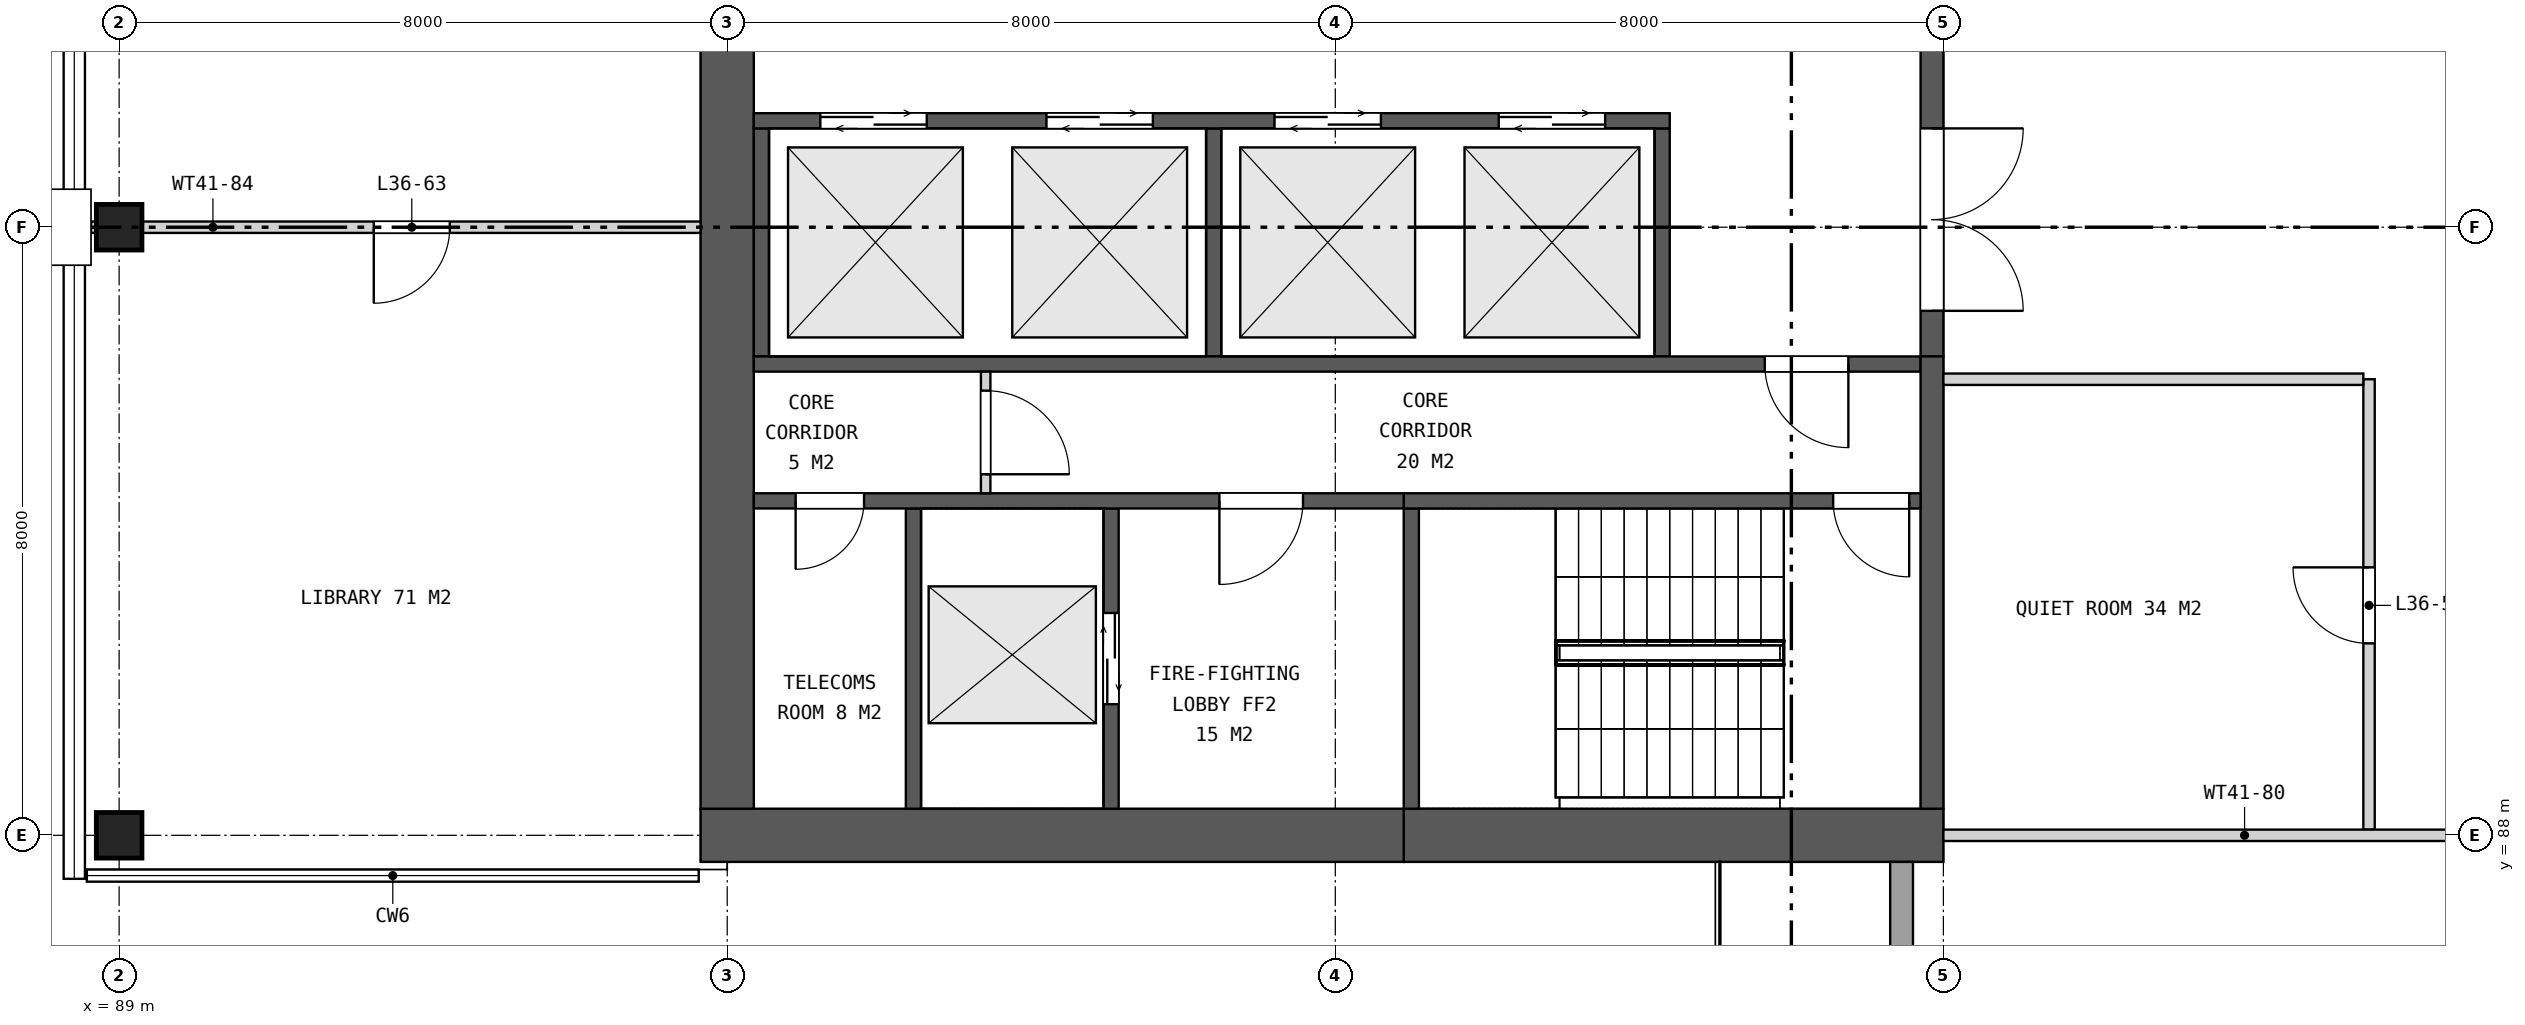
"""IFC4 building model, lengths in metres.
Left out: names, types, materials, properties, quantities, classifications, styles, units other than length and angle.
Written with IfcOpenShell. Run it as: python <this file> out.ifc"""

import sys

from ifc_helpers import new_model, si_unit, direction, frame, frame_2d, origin, origin_2d, place, context, subcontext, project, spatial, rectangle, extrude, element, fill, save


model = new_model("IFC4")
c1 = context("Model", 3, precision=1e-05, world=origin(), true_north=direction((0.0, 1.0)))
c2 = subcontext(c1, "Body", "Model", "MODEL_VIEW")
j1 = project(units=[si_unit("LENGTHUNIT", "METRE"), si_unit("PLANEANGLEUNIT", "RADIAN")], contexts=[c1])
p1 = place(None, origin())
s1 = spatial("IfcSite", under=j1, at=p1, CompositionType="ELEMENT")
p2 = place(p1, origin())
s2 = spatial("IfcBuilding", under=s1, at=p2, CompositionType="ELEMENT")
p3 = place(p2, frame((0.0, 0.0, 171.5)))
s3 = spatial("IfcBuildingStorey", under=s2, at=p3, CompositionType="ELEMENT", Elevation=171.5)
for number, where, z_axis, x_axis in (
    (1, (89.0, 88.0, 0.0), (0.0, 0.0, 1.0), (1.0, 0.0, 0.0)),
    (2, (89.0, 96.0, 0.0), (0.0, 0.0, 1.0), (1.0, 0.0, 0.0)),
):
    element("IfcColumn", number, at=place(p3, frame(where, z_axis=z_axis, x_axis=x_axis)), inside=s3, PredefinedType="COLUMN", context=c2, shape_type="SweptSolid", body=[
        extrude(rectangle(XDim=0.6, YDim=0.6, at=origin_2d()), origin(), (0.0, 0.0, 1.0), 7.4),
    ])
p4 = place(p3, frame((113.0, 88.0, 0.0), z_axis=(0.0, 0.0, 1.0), x_axis=(-1.0, 0.0, 0.0)))
e3 = element("IfcWall", 3, at=p4, inside=s3, PredefinedType="SHEAR", context=c2, shape_type="SweptSolid", body=[
    extrude(rectangle(XDim=7.1, YDim=0.7, at=frame_2d((3.55, 0.0))), origin(), (0.0, 0.0, 1.0), 7.4),
])
p5 = place(p3, frame((105.9, 88.0, 0.0), z_axis=(0.0, 0.0, 1.0), x_axis=(-1.0, 0.0, 0.0)))
e4 = element("IfcWall", 4, at=p5, inside=s3, PredefinedType="SHEAR", context=c2, shape_type="SweptSolid", body=[
    extrude(rectangle(XDim=9.25, YDim=0.7, at=frame_2d((4.625, 0.0))), origin(), (0.0, 0.0, 1.0), 7.4),
])
p6 = place(p3, frame((97.0, 111.65, 0.0), z_axis=(0.0, 0.0, 1.0), x_axis=(0.0, -1.0, 0.0)))
e5 = element("IfcWall", 5, at=p6, inside=s3, PredefinedType="SHEAR", context=c2, shape_type="SweptSolid", body=[
    extrude(rectangle(XDim=23.3, YDim=0.7, at=frame_2d((11.65, 0.0))), origin(), (0.0, 0.0, 1.0), 7.4),
])
p7 = place(p6, frame((10.45, 0.0, 0.0)))
e6 = element("IfcOpeningElement", 6, at=p7, cuts=e5, PredefinedType="OPENING", context=c2, shape_type="SweptSolid", body=[
    extrude(rectangle(XDim=2.4, YDim=2.4, at=frame_2d((1.2, 1.2))), frame((0.0, 0.36, 0.0), z_axis=(0.0, -1.0, 0.0), x_axis=(1.0, 0.0, 0.0)), (0.0, 0.0, 1.0), 0.72),
])
p8 = place(p3, frame((112.85, 105.7, 0.0), z_axis=(0.0, 0.0, 1.0), x_axis=(0.0, -1.0, 0.0)))
e7 = element("IfcWall", 7, at=p8, inside=s3, PredefinedType="SHEAR", context=c2, shape_type="SweptSolid", body=[
    extrude(rectangle(XDim=11.4, YDim=0.3, at=frame_2d((5.7, 0.0))), origin(), (0.0, 0.0, 1.0), 7.4),
])
p9 = place(p8, frame((0.6, 0.0, 0.0)))
e8 = element("IfcOpeningElement", 8, at=p9, cuts=e7, PredefinedType="OPENING", context=c2, shape_type="SweptSolid", body=[
    extrude(rectangle(XDim=2.4, YDim=2.4, at=frame_2d((1.2, 1.2))), frame((0.0, 0.16, 0.0), z_axis=(0.0, -1.0, 0.0), x_axis=(1.0, 0.0, 0.0)), (0.0, 0.0, 1.0), 0.32),
])
p10 = place(p8, frame((4.5, 0.0, 0.0)))
e9 = element("IfcOpeningElement", 9, at=p10, cuts=e7, PredefinedType="OPENING", context=c2, shape_type="SweptSolid", body=[
    extrude(rectangle(XDim=2.4, YDim=2.4, at=frame_2d((1.2, 1.2))), frame((0.0, 0.16, 0.0), z_axis=(0.0, -1.0, 0.0), x_axis=(1.0, 0.0, 0.0)), (0.0, 0.0, 1.0), 0.32),
])
p11 = place(p8, frame((8.4, 0.0, 0.0)))
e10 = element("IfcOpeningElement", 10, at=p11, cuts=e7, PredefinedType="OPENING", context=c2, shape_type="SweptSolid", body=[
    extrude(rectangle(XDim=2.4, YDim=2.4, at=frame_2d((1.2, 1.2))), frame((0.0, 0.16, 0.0), z_axis=(0.0, -1.0, 0.0), x_axis=(1.0, 0.0, 0.0)), (0.0, 0.0, 1.0), 0.32),
])
for number, where, z_axis, x_axis in (
    (11, (109.3, 97.3, 0.0), (0.0, 0.0, 1.0), (0.0, -1.0, 0.0)),
    (12, (103.4, 97.3, 0.0), (0.0, 0.0, 1.0), (0.0, -1.0, 0.0)),
    (13, (97.45, 97.3, 0.0), (0.0, 0.0, 1.0), (0.0, -1.0, 0.0)),
):
    element("IfcWall", number, at=place(p3, frame(where, z_axis=z_axis, x_axis=x_axis)), inside=s3, PredefinedType="SHEAR", context=c2, shape_type="SweptSolid", body=[
        extrude(rectangle(XDim=3.0, YDim=0.2, at=frame_2d((1.5, 0.0))), origin(), (0.0, 0.0, 1.0), 7.4),
    ])
p12 = place(p3, frame((109.4, 97.4, 0.0), z_axis=(0.0, 0.0, 1.0), x_axis=(-1.0, 0.0, 0.0)))
e14 = element("IfcWall", 14, at=p12, inside=s3, PredefinedType="SHEAR", context=c2, shape_type="SweptSolid", body=[
    extrude(rectangle(XDim=12.05, YDim=0.2, at=frame_2d((6.025, 0.0))), origin(), (0.0, 0.0, 1.0), 7.4),
])
p13 = place(p12, frame((0.85, 0.0, 0.0)))
e15 = element("IfcOpeningElement", 15, at=p13, cuts=e14, PredefinedType="OPENING", context=c2, shape_type="SweptSolid", body=[
    extrude(rectangle(XDim=1.4, YDim=2.1, at=frame_2d((0.7, 1.05))), frame((0.0, 0.11, 0.0), z_axis=(0.0, -1.0, 0.0), x_axis=(1.0, 0.0, 0.0)), (0.0, 0.0, 1.0), 0.22),
])
p14 = place(p12, frame((3.8, 0.0, 0.0)))
e16 = element("IfcOpeningElement", 16, at=p14, cuts=e14, PredefinedType="OPENING", context=c2, shape_type="SweptSolid", body=[
    extrude(rectangle(XDim=1.4, YDim=2.1, at=frame_2d((0.7, 1.05))), frame((0.0, 0.11, 0.0), z_axis=(0.0, -1.0, 0.0), x_axis=(1.0, 0.0, 0.0)), (0.0, 0.0, 1.0), 0.22),
])
p15 = place(p12, frame((6.8, 0.0, 0.0)))
e17 = element("IfcOpeningElement", 17, at=p15, cuts=e14, PredefinedType="OPENING", context=c2, shape_type="SweptSolid", body=[
    extrude(rectangle(XDim=1.4, YDim=2.1, at=frame_2d((0.7, 1.05))), frame((0.0, 0.11, 0.0), z_axis=(0.0, -1.0, 0.0), x_axis=(1.0, 0.0, 0.0)), (0.0, 0.0, 1.0), 0.22),
])
p16 = place(p12, frame((9.775, 0.0, 0.0)))
e18 = element("IfcOpeningElement", 18, at=p16, cuts=e14, PredefinedType="OPENING", context=c2, shape_type="SweptSolid", body=[
    extrude(rectangle(XDim=1.4, YDim=2.1, at=frame_2d((0.7, 1.05))), frame((0.0, 0.11, 0.0), z_axis=(0.0, -1.0, 0.0), x_axis=(1.0, 0.0, 0.0)), (0.0, 0.0, 1.0), 0.22),
])
p17 = place(p3, frame((112.7, 94.2, 0.0), z_axis=(0.0, 0.0, 1.0), x_axis=(-1.0, 0.0, 0.0)))
e19 = element("IfcWall", 19, at=p17, inside=s3, PredefinedType="SHEAR", context=c2, shape_type="SweptSolid", body=[
    extrude(rectangle(XDim=15.35, YDim=0.2, at=frame_2d((7.675, 0.0))), origin(), (0.0, 0.0, 1.0), 7.4),
])
p18 = place(p17, frame((0.95, 0.0, 0.0)))
e20 = element("IfcOpeningElement", 20, at=p18, cuts=e19, PredefinedType="OPENING", context=c2, shape_type="SweptSolid", body=[
    extrude(rectangle(XDim=1.1, YDim=2.1, at=frame_2d((0.55, 1.05))), frame((0.0, 0.11, 0.0), z_axis=(0.0, -1.0, 0.0), x_axis=(1.0, 0.0, 0.0)), (0.0, 0.0, 1.0), 0.22),
])
p19 = place(p3, frame((112.85, 94.3, 0.0), z_axis=(0.0, 0.0, 1.0), x_axis=(0.0, -1.0, 0.0)))
e21 = element("IfcWall", 21, at=p19, inside=s3, PredefinedType="SHEAR", context=c2, shape_type="SweptSolid", body=[
    extrude(rectangle(XDim=5.95, YDim=0.3, at=frame_2d((2.975, 0.0))), origin(), (0.0, 0.0, 1.0), 7.4),
])
p20 = place(p3, frame((106.0, 92.3, 0.0), z_axis=(0.0, 0.0, 1.0), x_axis=(0.0, -1.0, 0.0)))
e22 = element("IfcWall", 22, at=p20, inside=s3, PredefinedType="SHEAR", context=c2, shape_type="SweptSolid", body=[
    extrude(rectangle(XDim=3.95, YDim=0.2, at=frame_2d((1.975, 0.0))), origin(), (0.0, 0.0, 1.0), 7.4),
])
p21 = place(p3, frame((102.05, 92.3, 0.0), z_axis=(0.0, 0.0, 1.0), x_axis=(0.0, -1.0, 0.0)))
e23 = element("IfcWall", 23, at=p21, inside=s3, PredefinedType="SHEAR", context=c2, shape_type="SweptSolid", body=[
    extrude(rectangle(XDim=3.95, YDim=0.2, at=frame_2d((1.975, 0.0))), origin(), (0.0, 0.0, 1.0), 7.4),
])
p22 = place(p21, frame((1.375, 0.0, 0.0)))
e24 = element("IfcOpeningElement", 24, at=p22, cuts=e23, PredefinedType="OPENING", context=c2, shape_type="SweptSolid", body=[
    extrude(rectangle(XDim=1.2, YDim=2.1, at=frame_2d((0.6, 1.05))), frame((0.0, 0.11, 0.0), z_axis=(0.0, -1.0, 0.0), x_axis=(1.0, 0.0, 0.0)), (0.0, 0.0, 1.0), 0.22),
])
p23 = place(p3, frame((99.45, 92.3, 0.0), z_axis=(0.0, 0.0, 1.0), x_axis=(0.0, -1.0, 0.0)))
e25 = element("IfcWall", 25, at=p23, inside=s3, PredefinedType="SHEAR", context=c2, shape_type="SweptSolid", body=[
    extrude(rectangle(XDim=3.95, YDim=0.2, at=frame_2d((1.975, 0.0))), origin(), (0.0, 0.0, 1.0), 7.4),
])
p24 = place(p3, frame((112.7, 92.4, 0.0), z_axis=(0.0, 0.0, 1.0), x_axis=(-1.0, 0.0, 0.0)))
e26 = element("IfcWall", 26, at=p24, inside=s3, PredefinedType="SHEAR", context=c2, shape_type="SweptSolid", body=[
    extrude(rectangle(XDim=6.8, YDim=0.2, at=frame_2d((3.4, 0.0))), origin(), (0.0, 0.0, 1.0), 7.4),
])
p25 = place(p24, frame((0.15, 0.0, 0.0)))
e27 = element("IfcOpeningElement", 27, at=p25, cuts=e26, PredefinedType="OPENING", context=c2, shape_type="SweptSolid", body=[
    extrude(rectangle(XDim=1.0, YDim=2.1, at=frame_2d((0.5, 1.05))), frame((0.0, 0.11, 0.0), z_axis=(0.0, -1.0, 0.0), x_axis=(1.0, 0.0, 0.0)), (0.0, 0.0, 1.0), 0.22),
])
p26 = place(p3, frame((105.9, 92.4, 0.0), z_axis=(0.0, 0.0, 1.0), x_axis=(-1.0, 0.0, 0.0)))
e28 = element("IfcWall", 28, at=p26, inside=s3, PredefinedType="SHEAR", context=c2, shape_type="SweptSolid", body=[
    extrude(rectangle(XDim=8.55, YDim=0.2, at=frame_2d((4.275, 0.0))), origin(), (0.0, 0.0, 1.0), 7.4),
])
p27 = place(p26, frame((1.325, 0.0, 0.0)))
e29 = element("IfcOpeningElement", 29, at=p27, cuts=e28, PredefinedType="OPENING", context=c2, shape_type="SweptSolid", body=[
    extrude(rectangle(XDim=1.1, YDim=2.1, at=frame_2d((0.55, 1.05))), frame((0.0, 0.11, 0.0), z_axis=(0.0, -1.0, 0.0), x_axis=(1.0, 0.0, 0.0)), (0.0, 0.0, 1.0), 0.22),
])
p28 = place(p26, frame((7.1, 0.0, 0.0)))
e30 = element("IfcOpeningElement", 30, at=p28, cuts=e28, PredefinedType="OPENING", context=c2, shape_type="SweptSolid", body=[
    extrude(rectangle(XDim=0.9, YDim=2.1, at=frame_2d((0.45, 1.05))), frame((0.0, 0.11, 0.0), z_axis=(0.0, -1.0, 0.0), x_axis=(1.0, 0.0, 0.0)), (0.0, 0.0, 1.0), 0.22),
])
p29 = place(p3, frame((100.4, 94.1, 0.0), z_axis=(0.0, 0.0, 1.0), x_axis=(0.0, -1.0, 0.0)))
e31 = element("IfcWall", 31, at=p29, inside=s3, PredefinedType="PARTITIONING", context=c2, shape_type="SweptSolid", body=[
    extrude(rectangle(XDim=1.6, YDim=0.125, at=frame_2d((0.8, 0.0))), origin(), (0.0, 0.0, 1.0), 7.4),
])
p30 = place(p29, frame((0.25, 0.0, 0.0)))
e32 = element("IfcOpeningElement", 32, at=p30, cuts=e31, PredefinedType="OPENING", context=c2, shape_type="SweptSolid", body=[
    extrude(rectangle(XDim=1.1, YDim=2.1, at=frame_2d((0.55, 1.05))), frame((0.0, 0.073, 0.0), z_axis=(0.0, -1.0, 0.0), x_axis=(1.0, 0.0, 0.0)), (0.0, 0.0, 1.0), 0.145),
])
p31 = place(p3, frame((112.45, 87.65, 0.0), z_axis=(0.0, 0.0, 1.0), x_axis=(0.0, -1.0, 0.0)))
e33 = element("IfcWall", 33, at=p31, inside=s3, PredefinedType="SOLIDWALL", context=c2, shape_type="SweptSolid", body=[
    extrude(rectangle(XDim=7.612, YDim=0.3, at=frame_2d((3.806, 0.0))), origin(), (0.0, 0.0, 1.0), 7.1),
])
p32 = place(p31, frame((2.45, 0.0, 0.0)))
e34 = element("IfcOpeningElement", 34, at=p32, cuts=e33, PredefinedType="OPENING", context=c2, shape_type="SweptSolid", body=[
    extrude(rectangle(XDim=2.4, YDim=2.4, at=frame_2d((1.2, 1.2))), frame((0.0, 0.16, 0.0), z_axis=(0.0, -1.0, 0.0), x_axis=(1.0, 0.0, 0.0)), (0.0, 0.0, 1.0), 0.32),
])
p33 = place(p3, frame((118.6, 88.075, 0.0), z_axis=(0.0, 0.0, 1.0), x_axis=(0.0, 1.0, 0.0)))
e35 = element("IfcWall", 35, at=p33, inside=s3, PredefinedType="PARTITIONING", context=c2, shape_type="SweptSolid", body=[
    extrude(rectangle(XDim=5.925, YDim=0.15, at=frame_2d((2.962, 0.0))), origin(), (0.0, 0.0, 1.0), 6.64),
])
p34 = place(p33, frame((2.45, 0.0, 0.0)))
e36 = element("IfcOpeningElement", 36, at=p34, cuts=e35, PredefinedType="OPENING", context=c2, shape_type="SweptSolid", body=[
    extrude(rectangle(XDim=1.0, YDim=2.1, at=frame_2d((0.5, 1.05))), frame((0.0, 0.085, 0.0), z_axis=(0.0, -1.0, 0.0), x_axis=(1.0, 0.0, 0.0)), (0.0, 0.0, 1.0), 0.17),
])
p35 = place(p3, frame((113.0, 88.0, 0.0), z_axis=(0.0, 0.0, 1.0), x_axis=(1.0, 0.0, 0.0)))
e37 = element("IfcWall", 37, at=p35, inside=s3, PredefinedType="PARTITIONING", context=c2, shape_type="SweptSolid", body=[
    extrude(rectangle(XDim=7.925, YDim=0.15, at=frame_2d((3.962, 0.0))), origin(), (0.0, 0.0, 1.0), 6.64),
])
p36 = place(p3, frame((113.0, 94.0, 0.0), z_axis=(0.0, 0.0, 1.0), x_axis=(1.0, 0.0, 0.0)))
e38 = element("IfcWall", 38, at=p36, inside=s3, PredefinedType="PARTITIONING", context=c2, shape_type="SweptSolid", body=[
    extrude(rectangle(XDim=5.525, YDim=0.15, at=frame_2d((2.762, 0.0))), origin(), (0.0, 0.0, 1.0), 6.64),
])
p37 = place(p3, frame((88.63, 96.0, 0.0), z_axis=(0.0, 0.0, 1.0), x_axis=(1.0, 0.0, 0.0)))
e39 = element("IfcWall", 39, at=p37, inside=s3, PredefinedType="PARTITIONING", context=c2, shape_type="SweptSolid", body=[
    extrude(rectangle(XDim=8.02, YDim=0.15, at=frame_2d((4.01, 0.0))), origin(), (0.0, 0.0, 1.0), 6.64),
])
p38 = place(p37, frame((3.72, 0.0, 0.0)))
e40 = element("IfcOpeningElement", 40, at=p38, cuts=e39, PredefinedType="OPENING", context=c2, shape_type="SweptSolid", body=[
    extrude(rectangle(XDim=1.0, YDim=2.1, at=frame_2d((0.5, 1.05))), frame((0.0, 0.085, 0.0), z_axis=(0.0, -1.0, 0.0), x_axis=(1.0, 0.0, 0.0)), (0.0, 0.0, 1.0), 0.17),
])
p39 = place(p11, origin())
e41 = element("IfcDoor", 41, at=p39, inside=s3, OperationType="DOUBLE_DOOR_SINGLE_SWING", PredefinedType="DOOR", context=c2, shape_type="SweptSolid", body=[
    extrude(rectangle(XDim=2.4, YDim=2.4, at=frame_2d((1.2, 1.2))), frame((0.0, 0.025, 0.0), z_axis=(0.0, -1.0, 0.0), x_axis=(1.0, 0.0, 0.0)), (0.0, 0.0, 1.0), 0.05),
])
fill(e10, e41)
p40 = place(p13, origin())
e42 = element("IfcDoor", 42, at=p40, inside=s3, OperationType="DOUBLE_DOOR_SLIDING", PredefinedType="DOOR", context=c2, shape_type="SweptSolid", body=[
    extrude(rectangle(XDim=1.4, YDim=2.1, at=frame_2d((0.7, 1.05))), frame((0.0, 0.025, 0.0), z_axis=(0.0, -1.0, 0.0), x_axis=(1.0, 0.0, 0.0)), (0.0, 0.0, 1.0), 0.05),
])
fill(e15, e42)
p41 = place(p14, origin())
e43 = element("IfcDoor", 43, at=p41, inside=s3, OperationType="DOUBLE_DOOR_SLIDING", PredefinedType="DOOR", context=c2, shape_type="SweptSolid", body=[
    extrude(rectangle(XDim=1.4, YDim=2.1, at=frame_2d((0.7, 1.05))), frame((0.0, 0.025, 0.0), z_axis=(0.0, -1.0, 0.0), x_axis=(1.0, 0.0, 0.0)), (0.0, 0.0, 1.0), 0.05),
])
fill(e16, e43)
p42 = place(p15, origin())
e44 = element("IfcDoor", 44, at=p42, inside=s3, OperationType="DOUBLE_DOOR_SLIDING", PredefinedType="DOOR", context=c2, shape_type="SweptSolid", body=[
    extrude(rectangle(XDim=1.4, YDim=2.1, at=frame_2d((0.7, 1.05))), frame((0.0, 0.025, 0.0), z_axis=(0.0, -1.0, 0.0), x_axis=(1.0, 0.0, 0.0)), (0.0, 0.0, 1.0), 0.05),
])
fill(e17, e44)
p43 = place(p16, origin())
e45 = element("IfcDoor", 45, at=p43, inside=s3, OperationType="DOUBLE_DOOR_SLIDING", PredefinedType="DOOR", context=c2, shape_type="SweptSolid", body=[
    extrude(rectangle(XDim=1.4, YDim=2.1, at=frame_2d((0.7, 1.05))), frame((0.0, 0.025, 0.0), z_axis=(0.0, -1.0, 0.0), x_axis=(1.0, 0.0, 0.0)), (0.0, 0.0, 1.0), 0.05),
])
fill(e18, e45)
p44 = place(p18, origin())
e46 = element("IfcDoor", 46, at=p44, inside=s3, OperationType="SINGLE_SWING_LEFT", PredefinedType="DOOR", context=c2, shape_type="SweptSolid", body=[
    extrude(rectangle(XDim=1.1, YDim=2.1, at=frame_2d((0.55, 1.05))), frame((0.0, 0.025, 0.0), z_axis=(0.0, -1.0, 0.0), x_axis=(1.0, 0.0, 0.0)), (0.0, 0.0, 1.0), 0.05),
])
fill(e20, e46)
p45 = place(p22, origin())
e47 = element("IfcDoor", 47, at=p45, inside=s3, OperationType="DOUBLE_DOOR_SLIDING", PredefinedType="DOOR", context=c2, shape_type="SweptSolid", body=[
    extrude(rectangle(XDim=1.2, YDim=2.1, at=frame_2d((0.6, 1.05))), frame((0.0, 0.025, 0.0), z_axis=(0.0, -1.0, 0.0), x_axis=(1.0, 0.0, 0.0)), (0.0, 0.0, 1.0), 0.05),
])
fill(e24, e47)
p46 = place(p25, origin())
e48 = element("IfcDoor", 48, at=p46, inside=s3, OperationType="SINGLE_SWING_LEFT", PredefinedType="DOOR", context=c2, shape_type="SweptSolid", body=[
    extrude(rectangle(XDim=1.0, YDim=2.1, at=frame_2d((0.5, 1.05))), frame((0.0, 0.025, 0.0), z_axis=(0.0, -1.0, 0.0), x_axis=(1.0, 0.0, 0.0)), (0.0, 0.0, 1.0), 0.05),
])
fill(e27, e48)
p47 = place(p27, origin())
e49 = element("IfcDoor", 49, at=p47, inside=s3, OperationType="SINGLE_SWING_RIGHT", PredefinedType="DOOR", context=c2, shape_type="SweptSolid", body=[
    extrude(rectangle(XDim=1.1, YDim=2.1, at=frame_2d((0.55, 1.05))), frame((0.0, 0.025, 0.0), z_axis=(0.0, -1.0, 0.0), x_axis=(1.0, 0.0, 0.0)), (0.0, 0.0, 1.0), 0.05),
])
fill(e29, e49)
p48 = place(p28, origin())
e50 = element("IfcDoor", 50, at=p48, inside=s3, OperationType="SINGLE_SWING_RIGHT", PredefinedType="DOOR", context=c2, shape_type="SweptSolid", body=[
    extrude(rectangle(XDim=0.9, YDim=2.1, at=frame_2d((0.45, 1.05))), frame((0.0, 0.025, 0.0), z_axis=(0.0, -1.0, 0.0), x_axis=(1.0, 0.0, 0.0)), (0.0, 0.0, 1.0), 0.05),
])
fill(e30, e50)
p49 = place(p30, origin())
e51 = element("IfcDoor", 51, at=p49, inside=s3, OperationType="SINGLE_SWING_RIGHT", PredefinedType="DOOR", context=c2, shape_type="SweptSolid", body=[
    extrude(rectangle(XDim=1.1, YDim=2.1, at=frame_2d((0.55, 1.05))), frame((0.0, 0.025, 0.0), z_axis=(0.0, -1.0, 0.0), x_axis=(1.0, 0.0, 0.0)), (0.0, 0.0, 1.0), 0.05),
])
fill(e32, e51)
p50 = place(p34, origin())
e52 = element("IfcDoor", 52, at=p50, inside=s3, OperationType="SINGLE_SWING_RIGHT", PredefinedType="DOOR", context=c2, shape_type="SweptSolid", body=[
    extrude(rectangle(XDim=1.0, YDim=2.1, at=frame_2d((0.5, 1.05))), frame((0.0, 0.025, 0.0), z_axis=(0.0, -1.0, 0.0), x_axis=(1.0, 0.0, 0.0)), (0.0, 0.0, 1.0), 0.05),
])
fill(e36, e52)
p51 = place(p38, frame((1.0, 0.0, 0.0), z_axis=(0.0, 0.0, 1.0), x_axis=(-1.0, 0.0, 0.0)))
e53 = element("IfcDoor", 53, at=p51, inside=s3, OperationType="SINGLE_SWING_RIGHT", PredefinedType="DOOR", context=c2, shape_type="SweptSolid", body=[
    extrude(rectangle(XDim=1.0, YDim=2.1, at=frame_2d((0.5, 1.05))), frame((0.0, 0.025, 0.0), z_axis=(0.0, -1.0, 0.0), x_axis=(1.0, 0.0, 0.0)), (0.0, 0.0, 1.0), 0.05),
])
fill(e40, e53)
save(model, sys.argv[1])
